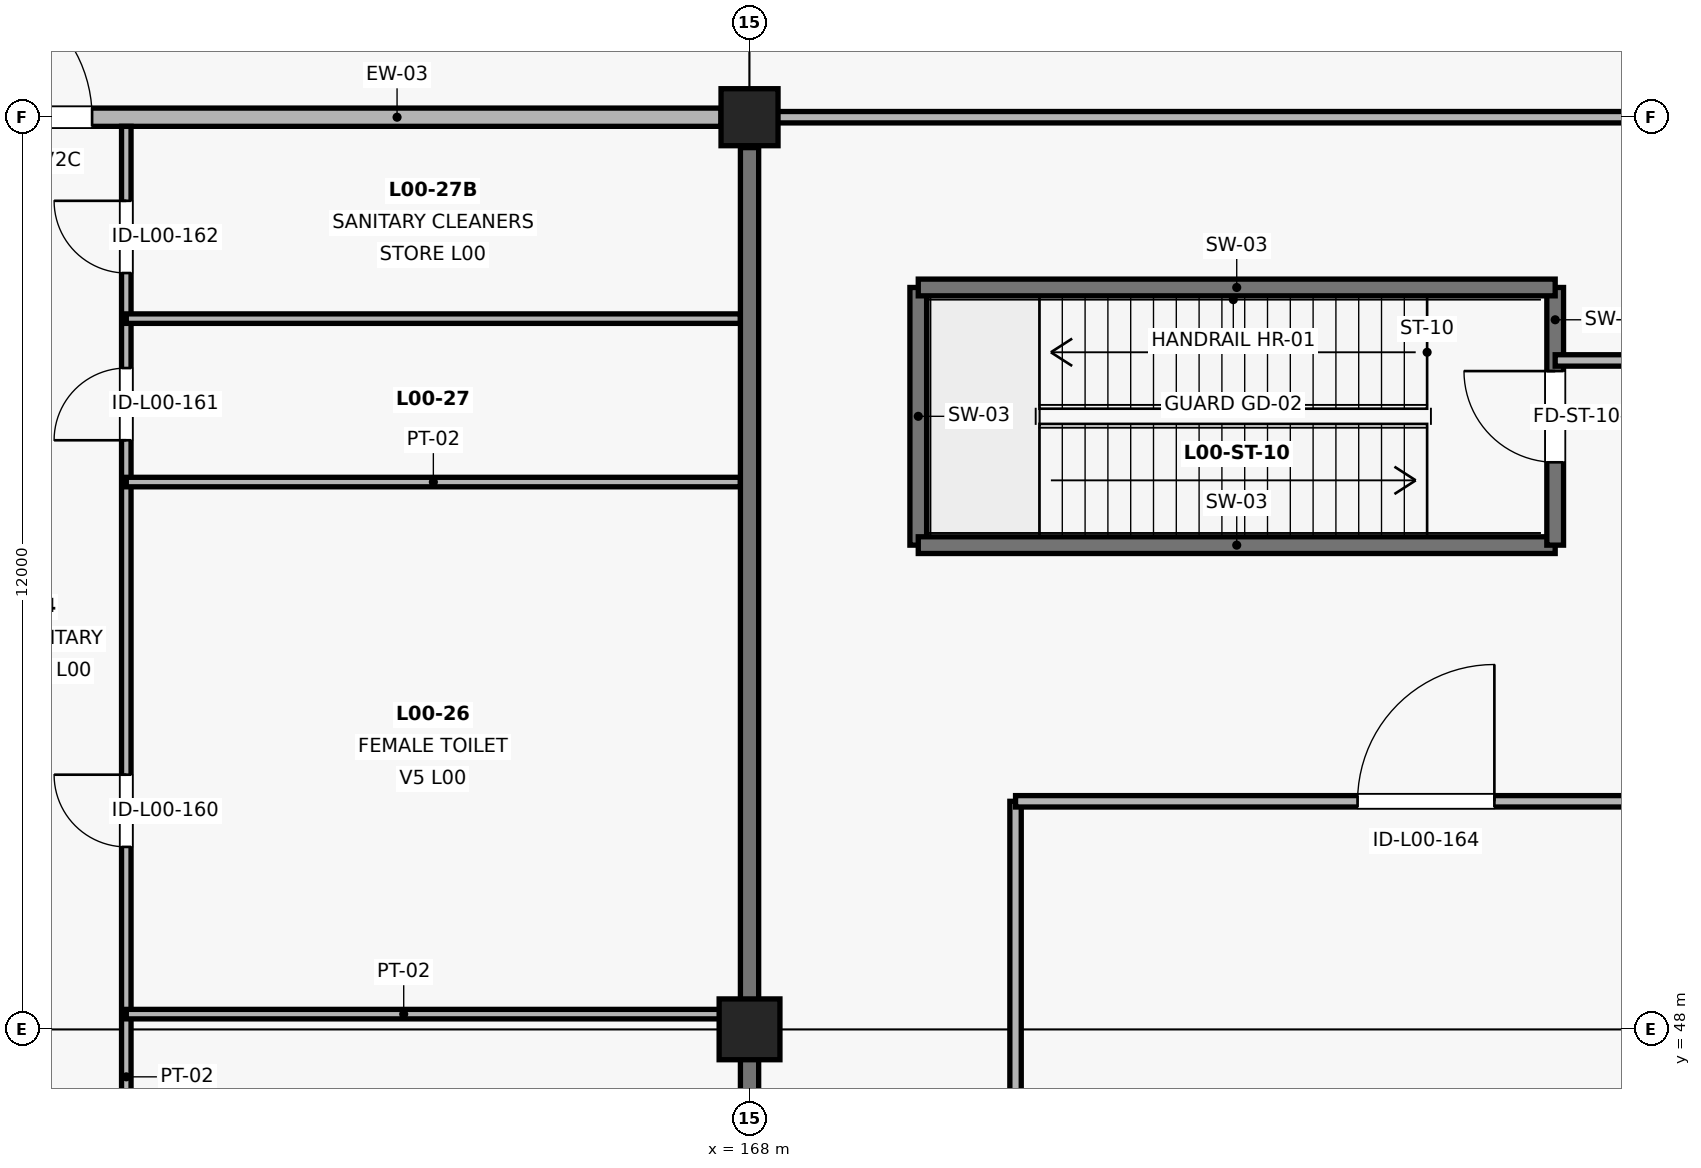
"""IFC4 building model, lengths in metres.
Left out: names, types, materials, properties, quantities, classifications, styles, units other than length and angle.
Written with IfcOpenShell. Run it as: python <this file> out.ifc"""

import sys

from ifc_helpers import new_model, si_unit, direction, frame, frame_2d, origin, origin_2d, place, context, subcontext, project, spatial, rectangle, extrude, element, fill, save


model = new_model("IFC4")
c1 = context("Model", 3, precision=1e-05, world=origin(), true_north=direction((0.0, 1.0)))
c2 = subcontext(c1, "Body", "Model", "MODEL_VIEW")
j1 = project(units=[si_unit("LENGTHUNIT", "METRE"), si_unit("PLANEANGLEUNIT", "RADIAN")], contexts=[c1])
p1 = place(None, origin())
s1 = spatial("IfcSite", under=j1, at=p1, CompositionType="ELEMENT")
p2 = place(p1, origin())
s2 = spatial("IfcBuilding", under=s1, at=p2, CompositionType="ELEMENT")
p3 = place(p2, origin())
s3 = spatial("IfcBuildingStorey", under=s2, at=p3, CompositionType="ELEMENT", Elevation=0.0)
p4 = place(p3, frame((168.0, 48.0, 0.0), z_axis=(0.0, 0.0, 1.0), x_axis=(1.0, 0.0, 0.0)))
e1 = element("IfcColumn", 1, at=p4, inside=s3, PredefinedType="COLUMN", context=c2, shape_type="SweptSolid", body=[
    extrude(rectangle(XDim=0.8, YDim=0.8, at=origin_2d()), origin(), (0.0, 0.0, 1.0), 6.6),
])
p5 = place(p3, frame((168.0, 60.0, 0.0), z_axis=(0.0, 0.0, 1.0), x_axis=(1.0, 0.0, 0.0)))
e2 = element("IfcColumn", 2, at=p5, inside=s3, PredefinedType="COLUMN", context=c2, shape_type="SweptSolid", body=[
    extrude(rectangle(XDim=0.75, YDim=0.75, at=origin_2d()), origin(), (0.0, 0.0, 1.0), 6.6),
])
p6 = place(p3, frame((156.375, 60.0, 0.0), z_axis=(0.0, 0.0, 1.0), x_axis=(1.0, 0.0, 0.0)))
e3 = element("IfcWall", 3, at=p6, inside=s3, PredefinedType="SOLIDWALL", context=c2, shape_type="SweptSolid", body=[
    extrude(rectangle(XDim=11.25, YDim=0.24, at=frame_2d((5.625, 0.0))), origin(), (0.0, 0.0, 1.0), 5.233),
])
p7 = place(p6, frame((1.175, 0.0, 0.0)))
e4 = element("IfcOpeningElement", 4, at=p7, cuts=e3, PredefinedType="OPENING", context=c2, shape_type="SweptSolid", body=[
    extrude(rectangle(XDim=1.8, YDim=2.2, at=frame_2d((0.9, 1.1))), frame((0.0, 0.135, 0.0), z_axis=(0.0, -1.0, 0.0), x_axis=(1.0, 0.0, 0.0)), (0.0, 0.0, 1.0), 0.27),
])
p8 = place(p3, frame((170.22, 57.76, 0.0), z_axis=(0.0, 0.0, 1.0), x_axis=(0.0, -1.0, 0.0)))
e5 = element("IfcWall", 5, at=p8, inside=s3, PredefinedType="SHEAR", context=c2, shape_type="SweptSolid", body=[
    extrude(rectangle(XDim=3.39, YDim=0.22, at=frame_2d((1.695, 0.0))), origin(), (0.0, 0.0, 1.0), 6.25),
])
p9 = place(p3, frame((170.22, 54.37, 0.0), z_axis=(0.0, 0.0, 1.0), x_axis=(1.0, 0.0, 0.0)))
e6 = element("IfcWall", 6, at=p9, inside=s3, PredefinedType="SHEAR", context=c2, shape_type="SweptSolid", body=[
    extrude(rectangle(XDim=8.38, YDim=0.22, at=frame_2d((4.19, 0.0))), origin(), (0.0, 0.0, 1.0), 6.25),
])
p10 = place(p3, frame((178.6, 54.37, 0.0), z_axis=(0.0, 0.0, 1.0), x_axis=(0.0, 1.0, 0.0)))
e7 = element("IfcWall", 7, at=p10, inside=s3, PredefinedType="SHEAR", context=c2, shape_type="SweptSolid", body=[
    extrude(rectangle(XDim=3.39, YDim=0.22, at=frame_2d((1.695, 0.0))), origin(), (0.0, 0.0, 1.0), 6.25),
])
p11 = place(p10, frame((1.09, 0.0, 0.0)))
e8 = element("IfcOpeningElement", 8, at=p11, cuts=e7, PredefinedType="OPENING", context=c2, shape_type="SweptSolid", body=[
    extrude(rectangle(XDim=1.2, YDim=2.2, at=frame_2d((0.6, 1.1))), frame((0.0, 0.125, 0.0), z_axis=(0.0, -1.0, 0.0), x_axis=(1.0, 0.0, 0.0)), (0.0, 0.0, 1.0), 0.25),
])
p12 = place(p3, frame((178.6, 57.76, 0.0), z_axis=(0.0, 0.0, 1.0), x_axis=(-1.0, 0.0, 0.0)))
e9 = element("IfcWall", 9, at=p12, inside=s3, PredefinedType="SHEAR", context=c2, shape_type="SweptSolid", body=[
    extrude(rectangle(XDim=8.38, YDim=0.22, at=frame_2d((4.19, 0.0))), origin(), (0.0, 0.0, 1.0), 6.25),
])
p13 = place(p3, frame((159.8, 41.2, 0.0), z_axis=(0.0, 0.0, 1.0), x_axis=(0.0, 1.0, 0.0)))
e10 = element("IfcWall", 10, at=p13, inside=s3, PredefinedType="PARTITIONING", context=c2, shape_type="SweptSolid", body=[
    extrude(rectangle(XDim=18.68, YDim=0.125, at=frame_2d((9.34, 0.0))), origin(), (0.0, 0.0, 1.0), 5.238),
])
p14 = place(p13, frame((2.2, 0.0, 0.0)))
e11 = element("IfcOpeningElement", 11, at=p14, cuts=e10, PredefinedType="OPENING", context=c2, shape_type="SweptSolid", body=[
    extrude(rectangle(XDim=0.95, YDim=2.1, at=frame_2d((0.475, 1.05))), frame((0.0, 0.077, 0.0), z_axis=(0.0, -1.0, 0.0), x_axis=(1.0, 0.0, 0.0)), (0.0, 0.0, 1.0), 0.155),
])
p15 = place(p13, frame((9.2, 0.0, 0.0)))
e12 = element("IfcOpeningElement", 12, at=p15, cuts=e10, PredefinedType="OPENING", context=c2, shape_type="SweptSolid", body=[
    extrude(rectangle(XDim=0.95, YDim=2.1, at=frame_2d((0.475, 1.05))), frame((0.0, 0.077, 0.0), z_axis=(0.0, -1.0, 0.0), x_axis=(1.0, 0.0, 0.0)), (0.0, 0.0, 1.0), 0.155),
])
p16 = place(p13, frame((14.55, 0.0, 0.0)))
e13 = element("IfcOpeningElement", 13, at=p16, cuts=e10, PredefinedType="OPENING", context=c2, shape_type="SweptSolid", body=[
    extrude(rectangle(XDim=0.95, YDim=2.1, at=frame_2d((0.475, 1.05))), frame((0.0, 0.077, 0.0), z_axis=(0.0, -1.0, 0.0), x_axis=(1.0, 0.0, 0.0)), (0.0, 0.0, 1.0), 0.155),
])
p17 = place(p13, frame((16.75, 0.0, 0.0)))
e14 = element("IfcOpeningElement", 14, at=p17, cuts=e10, PredefinedType="OPENING", context=c2, shape_type="SweptSolid", body=[
    extrude(rectangle(XDim=0.95, YDim=2.1, at=frame_2d((0.475, 1.05))), frame((0.0, 0.077, 0.0), z_axis=(0.0, -1.0, 0.0), x_axis=(1.0, 0.0, 0.0)), (0.0, 0.0, 1.0), 0.155),
])
for number, where, z_axis, x_axis in (
    (15, (159.8, 48.2, 0.0), (0.0, 0.0, 1.0), (1.0, 0.0, 0.0)),
    (16, (159.8, 55.2, 0.0), (0.0, 0.0, 1.0), (1.0, 0.0, 0.0)),
    (17, (159.8, 57.35, 0.0), (0.0, 0.0, 1.0), (1.0, 0.0, 0.0)),
):
    element("IfcWall", number, at=place(p3, frame(where, z_axis=z_axis, x_axis=x_axis)), inside=s3, PredefinedType="PARTITIONING", context=c2, shape_type="SweptSolid", body=[
        extrude(rectangle(XDim=8.08, YDim=0.125, at=frame_2d((4.04, 0.0))), origin(), (0.0, 0.0, 1.0), 5.283),
    ])
p18 = place(p3, frame((168.0, 24.4, 0.0), z_axis=(0.0, 0.0, 1.0), x_axis=(0.0, 1.0, 0.0)))
e18 = element("IfcWall", 18, at=p18, inside=s3, PredefinedType="SHEAR", context=c2, shape_type="SweptSolid", body=[
    extrude(rectangle(XDim=35.2, YDim=0.24, at=frame_2d((17.6, 0.0))), origin(), (0.0, 0.0, 1.0), 5.233),
])
p19 = place(p18, frame((14.3, 0.0, 0.0)))
e19 = element("IfcOpeningElement", 19, at=p19, cuts=e18, PredefinedType="OPENING", context=c2, shape_type="SweptSolid", body=[
    extrude(rectangle(XDim=1.8, YDim=2.2, at=frame_2d((0.9, 1.1))), frame((0.0, 0.135, 0.0), z_axis=(0.0, -1.0, 0.0), x_axis=(1.0, 0.0, 0.0)), (0.0, 0.0, 1.0), 0.27),
])
p20 = place(p3, frame((178.6, 56.8, 0.0), z_axis=(0.0, 0.0, 1.0), x_axis=(1.0, 0.0, 0.0)))
e20 = element("IfcWall", 20, at=p20, inside=s3, PredefinedType="PARTITIONING", context=c2, shape_type="SweptSolid", body=[
    extrude(rectangle(XDim=2.0, YDim=0.15, at=frame_2d((1.0, 0.0))), origin(), (0.0, 0.0, 1.0), 5.333),
])
p21 = place(p3, frame((171.5, 24.13, 0.0), z_axis=(0.0, 0.0, 1.0), x_axis=(0.0, 1.0, 0.0)))
e21 = element("IfcWall", 21, at=p21, inside=s3, PredefinedType="PARTITIONING", context=c2, shape_type="SweptSolid", body=[
    extrude(rectangle(XDim=26.87, YDim=0.15, at=frame_2d((13.435, 0.0))), origin(), (0.0, 0.0, 1.0), 5.233),
])
p22 = place(p3, frame((171.5, 51.0, 0.0), z_axis=(0.0, 0.0, 1.0), x_axis=(1.0, 0.0, 0.0)))
e22 = element("IfcWall", 22, at=p22, inside=s3, PredefinedType="PARTITIONING", context=c2, shape_type="SweptSolid", body=[
    extrude(rectangle(XDim=12.3, YDim=0.15, at=frame_2d((6.15, 0.0))), origin(), (0.0, 0.0, 1.0), 5.333),
])
p23 = place(p22, frame((4.5, 0.0, 0.0)))
e23 = element("IfcOpeningElement", 23, at=p23, cuts=e22, PredefinedType="OPENING", context=c2, shape_type="SweptSolid", body=[
    extrude(rectangle(XDim=1.8, YDim=2.2, at=frame_2d((0.9, 1.1))), frame((0.0, 0.09, 0.0), z_axis=(0.0, -1.0, 0.0), x_axis=(1.0, 0.0, 0.0)), (0.0, 0.0, 1.0), 0.18),
])
p24 = place(p3, frame((168.12, 60.0, 0.0), z_axis=(0.0, 0.0, 1.0), x_axis=(1.0, 0.0, 0.0)))
e24 = element("IfcWall", 24, at=p24, inside=s3, PredefinedType="PARTITIONING", context=c2, shape_type="SweptSolid", body=[
    extrude(rectangle(XDim=12.48, YDim=0.15, at=frame_2d((6.24, 0.0))), origin(), (0.0, 0.0, 1.0), 5.233),
])
p25 = place(p7, origin())
e25 = element("IfcDoor", 25, at=p25, inside=s3, OperationType="SINGLE_SWING_LEFT", PredefinedType="DOOR", context=c2, shape_type="SweptSolid", body=[
    extrude(rectangle(XDim=1.8, YDim=2.2, at=frame_2d((0.9, 1.1))), frame((0.0, 0.025, 0.0), z_axis=(0.0, -1.0, 0.0), x_axis=(1.0, 0.0, 0.0)), (0.0, 0.0, 1.0), 0.05),
])
fill(e4, e25)
p26 = place(p11, origin())
e26 = element("IfcDoor", 26, at=p26, inside=s3, OperationType="SINGLE_SWING_RIGHT", PredefinedType="DOOR", context=c2, shape_type="SweptSolid", body=[
    extrude(rectangle(XDim=1.2, YDim=2.2, at=frame_2d((0.6, 1.1))), frame((0.0, 0.025, 0.0), z_axis=(0.0, -1.0, 0.0), x_axis=(1.0, 0.0, 0.0)), (0.0, 0.0, 1.0), 0.05),
])
fill(e8, e26)
p27 = place(p15, origin())
e27 = element("IfcDoor", 27, at=p27, inside=s3, OperationType="SINGLE_SWING_RIGHT", PredefinedType="DOOR", context=c2, shape_type="SweptSolid", body=[
    extrude(rectangle(XDim=0.95, YDim=2.1, at=frame_2d((0.475, 1.05))), frame((0.0, 0.025, 0.0), z_axis=(0.0, -1.0, 0.0), x_axis=(1.0, 0.0, 0.0)), (0.0, 0.0, 1.0), 0.05),
])
fill(e12, e27)
p28 = place(p16, origin())
e28 = element("IfcDoor", 28, at=p28, inside=s3, OperationType="SINGLE_SWING_LEFT", PredefinedType="DOOR", context=c2, shape_type="SweptSolid", body=[
    extrude(rectangle(XDim=0.95, YDim=2.1, at=frame_2d((0.475, 1.05))), frame((0.0, 0.025, 0.0), z_axis=(0.0, -1.0, 0.0), x_axis=(1.0, 0.0, 0.0)), (0.0, 0.0, 1.0), 0.05),
])
fill(e13, e28)
p29 = place(p17, origin())
e29 = element("IfcDoor", 29, at=p29, inside=s3, OperationType="SINGLE_SWING_RIGHT", PredefinedType="DOOR", context=c2, shape_type="SweptSolid", body=[
    extrude(rectangle(XDim=0.95, YDim=2.1, at=frame_2d((0.475, 1.05))), frame((0.0, 0.025, 0.0), z_axis=(0.0, -1.0, 0.0), x_axis=(1.0, 0.0, 0.0)), (0.0, 0.0, 1.0), 0.05),
])
fill(e14, e29)
p30 = place(p23, origin())
e30 = element("IfcDoor", 30, at=p30, inside=s3, OperationType="SINGLE_SWING_RIGHT", PredefinedType="DOOR", context=c2, shape_type="SweptSolid", body=[
    extrude(rectangle(XDim=1.8, YDim=2.2, at=frame_2d((0.9, 1.1))), frame((0.0, 0.025, 0.0), z_axis=(0.0, -1.0, 0.0), x_axis=(1.0, 0.0, 0.0)), (0.0, 0.0, 1.0), 0.05),
])
fill(e23, e30)
save(model, sys.argv[1])
